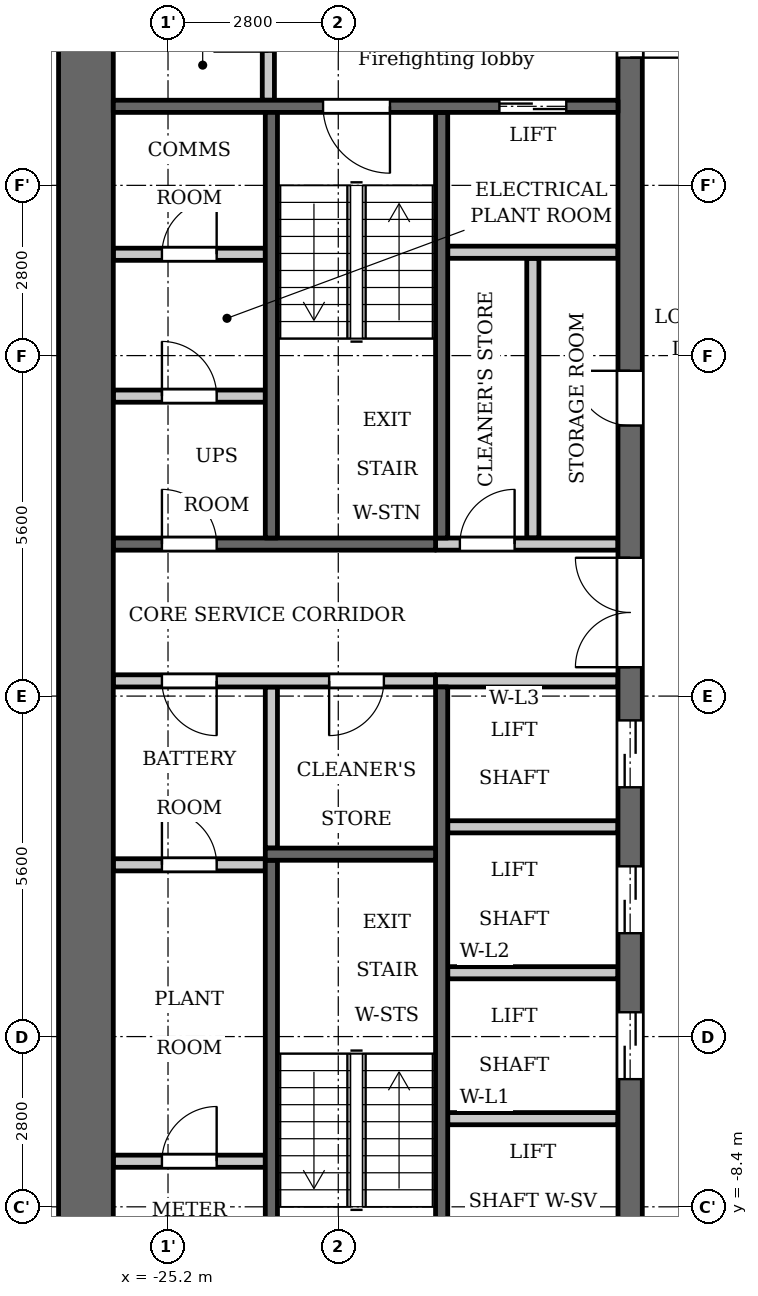
"""IFC4 building model, lengths in metres.
Left out: names, types, materials, properties, quantities, classifications, styles, units other than length and angle.
Written with IfcOpenShell. Run it as: python <this file> out.ifc"""

import sys

from ifc_helpers import new_model, si_unit, direction, frame, frame_2d, origin, place, context, subcontext, project, spatial, rectangle, extrude, element, fill, save


model = new_model("IFC4")
c1 = context("Model", 3, precision=1e-05, world=origin(), true_north=direction((0.0, 1.0)))
c2 = subcontext(c1, "Body", "Model", "MODEL_VIEW")
j1 = project(units=[si_unit("LENGTHUNIT", "METRE"), si_unit("PLANEANGLEUNIT", "RADIAN")], contexts=[c1])
p1 = place(None, origin())
s1 = spatial("IfcSite", under=j1, at=p1, CompositionType="ELEMENT")
p2 = place(p1, origin())
s2 = spatial("IfcBuilding", under=s1, at=p2, CompositionType="ELEMENT")
p3 = place(p2, frame((0.0, 0.0, 41.0)))
s3 = spatial("IfcBuildingStorey", under=s2, at=p3, CompositionType="ELEMENT", Elevation=41.0)
p4 = place(p3, frame((-23.5, -2.5, 0.0), z_axis=(0.0, 0.0, 1.0), x_axis=(0.0, 1.0, 0.0)))
e1 = element("IfcWall", 1, at=p4, inside=s3, PredefinedType="PARTITIONING", context=c2, shape_type="SweptSolid", body=[
    extrude(rectangle(XDim=2.65, YDim=0.2, at=frame_2d((1.325, 0.0))), origin(), (0.0, 0.0, 1.0), 3.2),
])
p5 = place(p3, frame((-20.7, 2.6, 0.0), z_axis=(0.0, 0.0, 1.0), x_axis=(0.0, 1.0, 0.0)))
e2 = element("IfcWall", 2, at=p5, inside=s3, PredefinedType="SHEAR", context=c2, shape_type="SweptSolid", body=[
    extrude(rectangle(XDim=7.0, YDim=0.2, at=frame_2d((3.5, 0.0))), origin(), (0.0, 0.0, 1.0), 3.2),
])
p6 = place(p3, frame((-20.7, -9.6, 0.0), z_axis=(0.0, 0.0, 1.0), x_axis=(0.0, 1.0, 0.0)))
e3 = element("IfcWall", 3, at=p6, inside=s3, PredefinedType="SHEAR", context=c2, shape_type="SweptSolid", body=[
    extrude(rectangle(XDim=9.75, YDim=0.2, at=frame_2d((4.875, 0.0))), origin(), (0.0, 0.0, 1.0), 3.2),
])
p7 = place(p3, frame((-20.8, 2.5, 0.0), z_axis=(0.0, 0.0, 1.0), x_axis=(-1.0, 0.0, 0.0)))
e4 = element("IfcWall", 4, at=p7, inside=s3, PredefinedType="SHEAR", context=c2, shape_type="SweptSolid", body=[
    extrude(rectangle(XDim=5.3, YDim=0.2, at=frame_2d((2.65, 0.0))), origin(), (0.0, 0.0, 1.0), 3.2),
])
p8 = place(p7, frame((3.6, 0.0, 0.0)))
e5 = element("IfcOpeningElement", 5, at=p8, cuts=e4, PredefinedType="OPENING", context=c2, shape_type="SweptSolid", body=[
    extrude(rectangle(XDim=0.9, YDim=2.1, at=frame_2d((0.45, 1.05))), frame((0.0, 0.11, 0.0), z_axis=(0.0, -1.0, 0.0), x_axis=(1.0, 0.0, 0.0)), (0.0, 0.0, 1.0), 0.22),
])
p9 = place(p3, frame((-20.8, 0.25, 0.0), z_axis=(0.0, 0.0, 1.0), x_axis=(-1.0, 0.0, 0.0)))
e6 = element("IfcWall", 6, at=p9, inside=s3, PredefinedType="PARTITIONING", context=c2, shape_type="SweptSolid", body=[
    extrude(rectangle(XDim=5.3, YDim=0.2, at=frame_2d((2.65, 0.0))), origin(), (0.0, 0.0, 1.0), 3.2),
])
p10 = place(p9, frame((0.85, 0.0, 0.0)))
e7 = element("IfcOpeningElement", 7, at=p10, cuts=e6, PredefinedType="OPENING", context=c2, shape_type="SweptSolid", body=[
    extrude(rectangle(XDim=0.9, YDim=2.1, at=frame_2d((0.45, 1.05))), frame((0.0, 0.11, 0.0), z_axis=(0.0, -1.0, 0.0), x_axis=(1.0, 0.0, 0.0)), (0.0, 0.0, 1.0), 0.22),
])
p11 = place(p9, frame((3.6, 0.0, 0.0)))
e8 = element("IfcOpeningElement", 8, at=p11, cuts=e6, PredefinedType="OPENING", context=c2, shape_type="SweptSolid", body=[
    extrude(rectangle(XDim=0.9, YDim=2.1, at=frame_2d((0.45, 1.05))), frame((0.0, 0.11, 0.0), z_axis=(0.0, -1.0, 0.0), x_axis=(1.0, 0.0, 0.0)), (0.0, 0.0, 1.0), 0.22),
])
p12 = place(p3, frame((-19.2, 2.6, 0.0), z_axis=(0.0, 0.0, 1.0), x_axis=(0.0, 1.0, 0.0)))
e9 = element("IfcWall", 9, at=p12, inside=s3, PredefinedType="PARTITIONING", context=c2, shape_type="SweptSolid", body=[
    extrude(rectangle(XDim=4.6, YDim=0.2, at=frame_2d((2.3, 0.0))), origin(), (0.0, 0.0, 1.0), 3.2),
])
p13 = place(p3, frame((-17.6, -12.3, 0.0), z_axis=(0.0, 0.0, 1.0), x_axis=(0.0, 1.0, 0.0)))
e10 = element("IfcWall", 10, at=p13, inside=s3, PredefinedType="SHEAR", context=c2, shape_type="SweptSolid", body=[
    extrude(rectangle(XDim=24.6, YDim=0.4, at=frame_2d((12.3, 0.0))), origin(), (0.0, 0.0, 1.0), 3.2),
])
p14 = place(p13, frame((6.0, 0.0, 0.0)))
e11 = element("IfcOpeningElement", 11, at=p14, cuts=e10, PredefinedType="OPENING", context=c2, shape_type="SweptSolid", body=[
    extrude(rectangle(XDim=1.1, YDim=2.1, at=frame_2d((0.55, 1.05))), frame((0.0, 0.21, 0.0), z_axis=(0.0, -1.0, 0.0), x_axis=(1.0, 0.0, 0.0)), (0.0, 0.0, 1.0), 0.42),
])
p15 = place(p13, frame((8.4, 0.0, 0.0)))
e12 = element("IfcOpeningElement", 12, at=p15, cuts=e10, PredefinedType="OPENING", context=c2, shape_type="SweptSolid", body=[
    extrude(rectangle(XDim=1.1, YDim=2.1, at=frame_2d((0.55, 1.05))), frame((0.0, 0.21, 0.0), z_axis=(0.0, -1.0, 0.0), x_axis=(1.0, 0.0, 0.0)), (0.0, 0.0, 1.0), 0.42),
])
p16 = place(p13, frame((10.8, 0.0, 0.0)))
e13 = element("IfcOpeningElement", 13, at=p16, cuts=e10, PredefinedType="OPENING", context=c2, shape_type="SweptSolid", body=[
    extrude(rectangle(XDim=1.1, YDim=2.1, at=frame_2d((0.55, 1.05))), frame((0.0, 0.21, 0.0), z_axis=(0.0, -1.0, 0.0), x_axis=(1.0, 0.0, 0.0)), (0.0, 0.0, 1.0), 0.42),
])
p17 = place(p13, frame((16.75, 0.0, 0.0)))
e14 = element("IfcOpeningElement", 14, at=p17, cuts=e10, PredefinedType="OPENING", context=c2, shape_type="SweptSolid", body=[
    extrude(rectangle(XDim=0.9, YDim=2.1, at=frame_2d((0.45, 1.05))), frame((0.0, 0.21, 0.0), z_axis=(0.0, -1.0, 0.0), x_axis=(1.0, 0.0, 0.0)), (0.0, 0.0, 1.0), 0.42),
])
p18 = place(p13, frame((22.8, 0.0, 0.0)))
e15 = element("IfcOpeningElement", 15, at=p18, cuts=e10, PredefinedType="OPENING", context=c2, shape_type="SweptSolid", body=[
    extrude(rectangle(XDim=1.1, YDim=2.1, at=frame_2d((0.55, 1.05))), frame((0.0, 0.21, 0.0), z_axis=(0.0, -1.0, 0.0), x_axis=(1.0, 0.0, 0.0)), (0.0, 0.0, 1.0), 0.42),
])
p19 = place(p13, frame((0.7, 0.0, 0.0)))
e16 = element("IfcOpeningElement", 16, at=p19, cuts=e10, PredefinedType="OPENING", context=c2, shape_type="SweptSolid", body=[
    extrude(rectangle(XDim=1.1, YDim=2.1, at=frame_2d((0.55, 1.05))), frame((0.0, 0.21, 0.0), z_axis=(0.0, -1.0, 0.0), x_axis=(1.0, 0.0, 0.0)), (0.0, 0.0, 1.0), 0.42),
])
p20 = place(p13, frame((12.775, 0.0, 0.0)))
e17 = element("IfcOpeningElement", 17, at=p20, cuts=e10, PredefinedType="OPENING", context=c2, shape_type="SweptSolid", body=[
    extrude(rectangle(XDim=1.8, YDim=2.1, at=frame_2d((0.9, 1.05))), frame((0.0, 0.21, 0.0), z_axis=(0.0, -1.0, 0.0), x_axis=(1.0, 0.0, 0.0)), (0.0, 0.0, 1.0), 0.42),
])
p21 = place(p3, frame((-26.55, -12.3, 0.0), z_axis=(0.0, 0.0, 1.0), x_axis=(0.0, 1.0, 0.0)))
e18 = element("IfcWall", 18, at=p21, inside=s3, PredefinedType="SHEAR", context=c2, shape_type="SweptSolid", body=[
    extrude(rectangle(XDim=24.6, YDim=0.9, at=frame_2d((12.3, 0.0))), origin(), (0.0, 0.0, 1.0), 3.2),
])
p22 = place(p3, frame((-23.55, 9.8, 0.0), z_axis=(0.0, 0.0, 1.0), x_axis=(0.0, 1.0, 0.0)))
e19 = element("IfcWall", 19, at=p22, inside=s3, PredefinedType="PARTITIONING", context=c2, shape_type="SweptSolid", body=[
    extrude(rectangle(XDim=2.5, YDim=0.2, at=frame_2d((1.25, 0.0))), origin(), (0.0, 0.0, 1.0), 3.2),
])
p23 = place(p22, frame((0.8, 0.0, 0.0)))
e20 = element("IfcOpeningElement", 20, at=p23, cuts=e19, PredefinedType="OPENING", context=c2, shape_type="SweptSolid", body=[
    extrude(rectangle(XDim=0.9, YDim=2.1, at=frame_2d((0.45, 1.05))), frame((0.0, 0.11, 0.0), z_axis=(0.0, -1.0, 0.0), x_axis=(1.0, 0.0, 0.0)), (0.0, 0.0, 1.0), 0.22),
])
p24 = place(p3, frame((-23.6, -7.65, 0.0), z_axis=(0.0, 0.0, 1.0), x_axis=(-1.0, 0.0, 0.0)))
e21 = element("IfcWall", 21, at=p24, inside=s3, PredefinedType="PARTITIONING", context=c2, shape_type="SweptSolid", body=[
    extrude(rectangle(XDim=2.5, YDim=0.2, at=frame_2d((1.25, 0.0))), origin(), (0.0, 0.0, 1.0), 3.2),
])
p25 = place(p24, frame((0.8, 0.0, 0.0)))
e22 = element("IfcOpeningElement", 22, at=p25, cuts=e21, PredefinedType="OPENING", context=c2, shape_type="SweptSolid", body=[
    extrude(rectangle(XDim=0.9, YDim=2.1, at=frame_2d((0.45, 1.05))), frame((0.0, 0.11, 0.0), z_axis=(0.0, -1.0, 0.0), x_axis=(1.0, 0.0, 0.0)), (0.0, 0.0, 1.0), 0.22),
])
p26 = place(p3, frame((-23.6, -2.775, 0.0), z_axis=(0.0, 0.0, 1.0), x_axis=(-1.0, 0.0, 0.0)))
e23 = element("IfcWall", 23, at=p26, inside=s3, PredefinedType="PARTITIONING", context=c2, shape_type="SweptSolid", body=[
    extrude(rectangle(XDim=2.5, YDim=0.2, at=frame_2d((1.25, 0.0))), origin(), (0.0, 0.0, 1.0), 3.2),
])
p27 = place(p26, frame((0.8, 0.0, 0.0)))
e24 = element("IfcOpeningElement", 24, at=p27, cuts=e23, PredefinedType="OPENING", context=c2, shape_type="SweptSolid", body=[
    extrude(rectangle(XDim=0.9, YDim=2.1, at=frame_2d((0.45, 1.05))), frame((0.0, 0.11, 0.0), z_axis=(0.0, -1.0, 0.0), x_axis=(1.0, 0.0, 0.0)), (0.0, 0.0, 1.0), 0.22),
])
p28 = place(p3, frame((-23.6, 4.933, 0.0), z_axis=(0.0, 0.0, 1.0), x_axis=(-1.0, 0.0, 0.0)))
e25 = element("IfcWall", 25, at=p28, inside=s3, PredefinedType="PARTITIONING", context=c2, shape_type="SweptSolid", body=[
    extrude(rectangle(XDim=2.5, YDim=0.2, at=frame_2d((1.25, 0.0))), origin(), (0.0, 0.0, 1.0), 3.2),
])
p29 = place(p28, frame((0.8, 0.0, 0.0)))
e26 = element("IfcOpeningElement", 26, at=p29, cuts=e25, PredefinedType="OPENING", context=c2, shape_type="SweptSolid", body=[
    extrude(rectangle(XDim=0.9, YDim=2.1, at=frame_2d((0.45, 1.05))), frame((0.0, 0.11, 0.0), z_axis=(0.0, -1.0, 0.0), x_axis=(1.0, 0.0, 0.0)), (0.0, 0.0, 1.0), 0.22),
])
p30 = place(p3, frame((-23.6, 7.267, 0.0), z_axis=(0.0, 0.0, 1.0), x_axis=(-1.0, 0.0, 0.0)))
e27 = element("IfcWall", 27, at=p30, inside=s3, PredefinedType="PARTITIONING", context=c2, shape_type="SweptSolid", body=[
    extrude(rectangle(XDim=2.5, YDim=0.2, at=frame_2d((1.25, 0.0))), origin(), (0.0, 0.0, 1.0), 3.2),
])
p31 = place(p30, frame((0.8, 0.0, 0.0)))
e28 = element("IfcOpeningElement", 28, at=p31, cuts=e27, PredefinedType="OPENING", context=c2, shape_type="SweptSolid", body=[
    extrude(rectangle(XDim=0.9, YDim=2.1, at=frame_2d((0.45, 1.05))), frame((0.0, 0.11, 0.0), z_axis=(0.0, -1.0, 0.0), x_axis=(1.0, 0.0, 0.0)), (0.0, 0.0, 1.0), 0.22),
])
for number, where, z_axis, x_axis in (
    (29, (-17.8, -6.95, 0.0), (0.0, 0.0, 1.0), (-1.0, 0.0, 0.0)),
    (30, (-17.8, -4.55, 0.0), (0.0, 0.0, 1.0), (-1.0, 0.0, 0.0)),
    (31, (-17.8, -2.15, 0.0), (0.0, 0.0, 1.0), (-1.0, 0.0, 0.0)),
):
    element("IfcWall", number, at=place(p3, frame(where, z_axis=z_axis, x_axis=x_axis)), inside=s3, PredefinedType="PARTITIONING", context=c2, shape_type="SweptSolid", body=[
        extrude(rectangle(XDim=2.8, YDim=0.2, at=frame_2d((1.4, 0.0))), origin(), (0.0, 0.0, 1.0), 3.2),
    ])
p32 = place(p3, frame((-17.8, 0.25, 0.0), z_axis=(0.0, 0.0, 1.0), x_axis=(-1.0, 0.0, 0.0)))
e32 = element("IfcWall", 32, at=p32, inside=s3, PredefinedType="PARTITIONING", context=c2, shape_type="SweptSolid", body=[
    extrude(rectangle(XDim=3.0, YDim=0.2, at=frame_2d((1.5, 0.0))), origin(), (0.0, 0.0, 1.0), 3.2),
])
p33 = place(p3, frame((-17.8, 2.5, 0.0), z_axis=(0.0, 0.0, 1.0), x_axis=(-1.0, 0.0, 0.0)))
e33 = element("IfcWall", 33, at=p33, inside=s3, PredefinedType="PARTITIONING", context=c2, shape_type="SweptSolid", body=[
    extrude(rectangle(XDim=3.0, YDim=0.2, at=frame_2d((1.5, 0.0))), origin(), (0.0, 0.0, 1.0), 3.2),
])
p34 = place(p33, frame((1.7, 0.0, 0.0)))
e34 = element("IfcOpeningElement", 34, at=p34, cuts=e33, PredefinedType="OPENING", context=c2, shape_type="SweptSolid", body=[
    extrude(rectangle(XDim=0.9, YDim=2.1, at=frame_2d((0.45, 1.05))), frame((0.0, 0.11, 0.0), z_axis=(0.0, -1.0, 0.0), x_axis=(1.0, 0.0, 0.0)), (0.0, 0.0, 1.0), 0.22),
])
p35 = place(p3, frame((-17.8, 7.3, 0.0), z_axis=(0.0, 0.0, 1.0), x_axis=(-1.0, 0.0, 0.0)))
e35 = element("IfcWall", 35, at=p35, inside=s3, PredefinedType="PARTITIONING", context=c2, shape_type="SweptSolid", body=[
    extrude(rectangle(XDim=2.8, YDim=0.2, at=frame_2d((1.4, 0.0))), origin(), (0.0, 0.0, 1.0), 3.2),
])
p36 = place(p3, frame((-17.8, 9.7, 0.0), z_axis=(0.0, 0.0, 1.0), x_axis=(-1.0, 0.0, 0.0)))
e36 = element("IfcWall", 36, at=p36, inside=s3, PredefinedType="SHEAR", context=c2, shape_type="SweptSolid", body=[
    extrude(rectangle(XDim=8.3, YDim=0.2, at=frame_2d((4.15, 0.0))), origin(), (0.0, 0.0, 1.0), 3.2),
])
p37 = place(p36, frame((0.85, 0.0, 0.0)))
e37 = element("IfcOpeningElement", 37, at=p37, cuts=e36, PredefinedType="OPENING", context=c2, shape_type="SweptSolid", body=[
    extrude(rectangle(XDim=1.1, YDim=2.1, at=frame_2d((0.55, 1.05))), frame((0.0, 0.11, 0.0), z_axis=(0.0, -1.0, 0.0), x_axis=(1.0, 0.0, 0.0)), (0.0, 0.0, 1.0), 0.22),
])
p38 = place(p36, frame((3.75, 0.0, 0.0)))
e38 = element("IfcOpeningElement", 38, at=p38, cuts=e36, PredefinedType="OPENING", context=c2, shape_type="SweptSolid", body=[
    extrude(rectangle(XDim=1.1, YDim=2.1, at=frame_2d((0.55, 1.05))), frame((0.0, 0.11, 0.0), z_axis=(0.0, -1.0, 0.0), x_axis=(1.0, 0.0, 0.0)), (0.0, 0.0, 1.0), 0.22),
])
p39 = place(p3, frame((-23.5, 2.6, 0.0), z_axis=(0.0, 0.0, 1.0), x_axis=(0.0, 1.0, 0.0)))
e39 = element("IfcWall", 39, at=p39, inside=s3, PredefinedType="SHEAR", context=c2, shape_type="SweptSolid", body=[
    extrude(rectangle(XDim=7.0, YDim=0.2, at=frame_2d((3.5, 0.0))), origin(), (0.0, 0.0, 1.0), 3.2),
])
p40 = place(p3, frame((-23.5, -9.6, 0.0), z_axis=(0.0, 0.0, 1.0), x_axis=(0.0, 1.0, 0.0)))
e40 = element("IfcWall", 40, at=p40, inside=s3, PredefinedType="SHEAR", context=c2, shape_type="SweptSolid", body=[
    extrude(rectangle(XDim=6.9, YDim=0.2, at=frame_2d((3.45, 0.0))), origin(), (0.0, 0.0, 1.0), 3.2),
])
p41 = place(p3, frame((-20.8, -2.6, 0.0), z_axis=(0.0, 0.0, 1.0), x_axis=(-1.0, 0.0, 0.0)))
e41 = element("IfcWall", 41, at=p41, inside=s3, PredefinedType="SHEAR", context=c2, shape_type="SweptSolid", body=[
    extrude(rectangle(XDim=2.8, YDim=0.2, at=frame_2d((1.4, 0.0))), origin(), (0.0, 0.0, 1.0), 3.2),
])
p42 = place(p14, origin())
e42 = element("IfcDoor", 42, at=p42, inside=s3, OperationType="DOUBLE_DOOR_SLIDING", PredefinedType="DOOR", context=c2, shape_type="SweptSolid", body=[
    extrude(rectangle(XDim=1.1, YDim=2.1, at=frame_2d((0.55, 1.05))), frame((0.0, 0.025, 0.0), z_axis=(0.0, -1.0, 0.0), x_axis=(1.0, 0.0, 0.0)), (0.0, 0.0, 1.0), 0.05),
])
fill(e11, e42)
p43 = place(p15, origin())
e43 = element("IfcDoor", 43, at=p43, inside=s3, OperationType="DOUBLE_DOOR_SLIDING", PredefinedType="DOOR", context=c2, shape_type="SweptSolid", body=[
    extrude(rectangle(XDim=1.1, YDim=2.1, at=frame_2d((0.55, 1.05))), frame((0.0, 0.025, 0.0), z_axis=(0.0, -1.0, 0.0), x_axis=(1.0, 0.0, 0.0)), (0.0, 0.0, 1.0), 0.05),
])
fill(e12, e43)
p44 = place(p16, origin())
e44 = element("IfcDoor", 44, at=p44, inside=s3, OperationType="DOUBLE_DOOR_SLIDING", PredefinedType="DOOR", context=c2, shape_type="SweptSolid", body=[
    extrude(rectangle(XDim=1.1, YDim=2.1, at=frame_2d((0.55, 1.05))), frame((0.0, 0.025, 0.0), z_axis=(0.0, -1.0, 0.0), x_axis=(1.0, 0.0, 0.0)), (0.0, 0.0, 1.0), 0.05),
])
fill(e13, e44)
p45 = place(p17, origin())
e45 = element("IfcDoor", 45, at=p45, inside=s3, OperationType="SINGLE_SWING_LEFT", PredefinedType="DOOR", context=c2, shape_type="SweptSolid", body=[
    extrude(rectangle(XDim=0.9, YDim=2.1, at=frame_2d((0.45, 1.05))), frame((0.0, 0.025, 0.0), z_axis=(0.0, -1.0, 0.0), x_axis=(1.0, 0.0, 0.0)), (0.0, 0.0, 1.0), 0.05),
])
fill(e14, e45)
p46 = place(p34, origin())
e46 = element("IfcDoor", 46, at=p46, inside=s3, OperationType="SINGLE_SWING_LEFT", PredefinedType="DOOR", context=c2, shape_type="SweptSolid", body=[
    extrude(rectangle(XDim=0.9, YDim=2.1, at=frame_2d((0.45, 1.05))), frame((0.0, 0.025, 0.0), z_axis=(0.0, -1.0, 0.0), x_axis=(1.0, 0.0, 0.0)), (0.0, 0.0, 1.0), 0.05),
])
fill(e34, e46)
p47 = place(p37, origin())
e47 = element("IfcDoor", 47, at=p47, inside=s3, OperationType="DOUBLE_DOOR_SLIDING", PredefinedType="DOOR", context=c2, shape_type="SweptSolid", body=[
    extrude(rectangle(XDim=1.1, YDim=2.1, at=frame_2d((0.55, 1.05))), frame((0.0, 0.025, 0.0), z_axis=(0.0, -1.0, 0.0), x_axis=(1.0, 0.0, 0.0)), (0.0, 0.0, 1.0), 0.05),
])
fill(e37, e47)
p48 = place(p18, origin())
e48 = element("IfcDoor", 48, at=p48, inside=s3, OperationType="SINGLE_SWING_LEFT", PredefinedType="DOOR", context=c2, shape_type="SweptSolid", body=[
    extrude(rectangle(XDim=1.1, YDim=2.1, at=frame_2d((0.55, 1.05))), frame((0.0, 0.025, 0.0), z_axis=(0.0, -1.0, 0.0), x_axis=(1.0, 0.0, 0.0)), (0.0, 0.0, 1.0), 0.05),
])
fill(e15, e48)
p49 = place(p38, origin())
e49 = element("IfcDoor", 49, at=p49, inside=s3, OperationType="SINGLE_SWING_RIGHT", PredefinedType="DOOR", context=c2, shape_type="SweptSolid", body=[
    extrude(rectangle(XDim=1.1, YDim=2.1, at=frame_2d((0.55, 1.05))), frame((0.0, 0.025, 0.0), z_axis=(0.0, -1.0, 0.0), x_axis=(1.0, 0.0, 0.0)), (0.0, 0.0, 1.0), 0.05),
])
fill(e38, e49)
p50 = place(p20, origin())
e50 = element("IfcDoor", 50, at=p50, inside=s3, OperationType="DOUBLE_DOOR_SINGLE_SWING", PredefinedType="DOOR", context=c2, shape_type="SweptSolid", body=[
    extrude(rectangle(XDim=1.8, YDim=2.1, at=frame_2d((0.9, 1.05))), frame((0.0, 0.025, 0.0), z_axis=(0.0, -1.0, 0.0), x_axis=(1.0, 0.0, 0.0)), (0.0, 0.0, 1.0), 0.05),
])
fill(e17, e50)
p51 = place(p10, origin())
e51 = element("IfcDoor", 51, at=p51, inside=s3, OperationType="SINGLE_SWING_LEFT", PredefinedType="DOOR", context=c2, shape_type="SweptSolid", body=[
    extrude(rectangle(XDim=0.9, YDim=2.1, at=frame_2d((0.45, 1.05))), frame((0.0, 0.025, 0.0), z_axis=(0.0, -1.0, 0.0), x_axis=(1.0, 0.0, 0.0)), (0.0, 0.0, 1.0), 0.05),
])
fill(e7, e51)
p52 = place(p25, origin())
e52 = element("IfcDoor", 52, at=p52, inside=s3, OperationType="SINGLE_SWING_LEFT", PredefinedType="DOOR", context=c2, shape_type="SweptSolid", body=[
    extrude(rectangle(XDim=0.9, YDim=2.1, at=frame_2d((0.45, 1.05))), frame((0.0, 0.025, 0.0), z_axis=(0.0, -1.0, 0.0), x_axis=(1.0, 0.0, 0.0)), (0.0, 0.0, 1.0), 0.05),
])
fill(e22, e52)
p53 = place(p27, origin())
e53 = element("IfcDoor", 53, at=p53, inside=s3, OperationType="SINGLE_SWING_RIGHT", PredefinedType="DOOR", context=c2, shape_type="SweptSolid", body=[
    extrude(rectangle(XDim=0.9, YDim=2.1, at=frame_2d((0.45, 1.05))), frame((0.0, 0.025, 0.0), z_axis=(0.0, -1.0, 0.0), x_axis=(1.0, 0.0, 0.0)), (0.0, 0.0, 1.0), 0.05),
])
fill(e24, e53)
p54 = place(p11, origin())
e54 = element("IfcDoor", 54, at=p54, inside=s3, OperationType="SINGLE_SWING_RIGHT", PredefinedType="DOOR", context=c2, shape_type="SweptSolid", body=[
    extrude(rectangle(XDim=0.9, YDim=2.1, at=frame_2d((0.45, 1.05))), frame((0.0, 0.025, 0.0), z_axis=(0.0, -1.0, 0.0), x_axis=(1.0, 0.0, 0.0)), (0.0, 0.0, 1.0), 0.05),
])
fill(e8, e54)
p55 = place(p29, origin())
e55 = element("IfcDoor", 55, at=p55, inside=s3, OperationType="SINGLE_SWING_RIGHT", PredefinedType="DOOR", context=c2, shape_type="SweptSolid", body=[
    extrude(rectangle(XDim=0.9, YDim=2.1, at=frame_2d((0.45, 1.05))), frame((0.0, 0.025, 0.0), z_axis=(0.0, -1.0, 0.0), x_axis=(1.0, 0.0, 0.0)), (0.0, 0.0, 1.0), 0.05),
])
fill(e26, e55)
p56 = place(p31, origin())
e56 = element("IfcDoor", 56, at=p56, inside=s3, OperationType="SINGLE_SWING_LEFT", PredefinedType="DOOR", context=c2, shape_type="SweptSolid", body=[
    extrude(rectangle(XDim=0.9, YDim=2.1, at=frame_2d((0.45, 1.05))), frame((0.0, 0.025, 0.0), z_axis=(0.0, -1.0, 0.0), x_axis=(1.0, 0.0, 0.0)), (0.0, 0.0, 1.0), 0.05),
])
fill(e28, e56)
p57 = place(p8, origin())
e57 = element("IfcDoor", 57, at=p57, inside=s3, OperationType="SINGLE_SWING_RIGHT", PredefinedType="DOOR", context=c2, shape_type="SweptSolid", body=[
    extrude(rectangle(XDim=0.9, YDim=2.1, at=frame_2d((0.45, 1.05))), frame((0.0, 0.025, 0.0), z_axis=(0.0, -1.0, 0.0), x_axis=(1.0, 0.0, 0.0)), (0.0, 0.0, 1.0), 0.05),
])
fill(e5, e57)
save(model, sys.argv[1])
